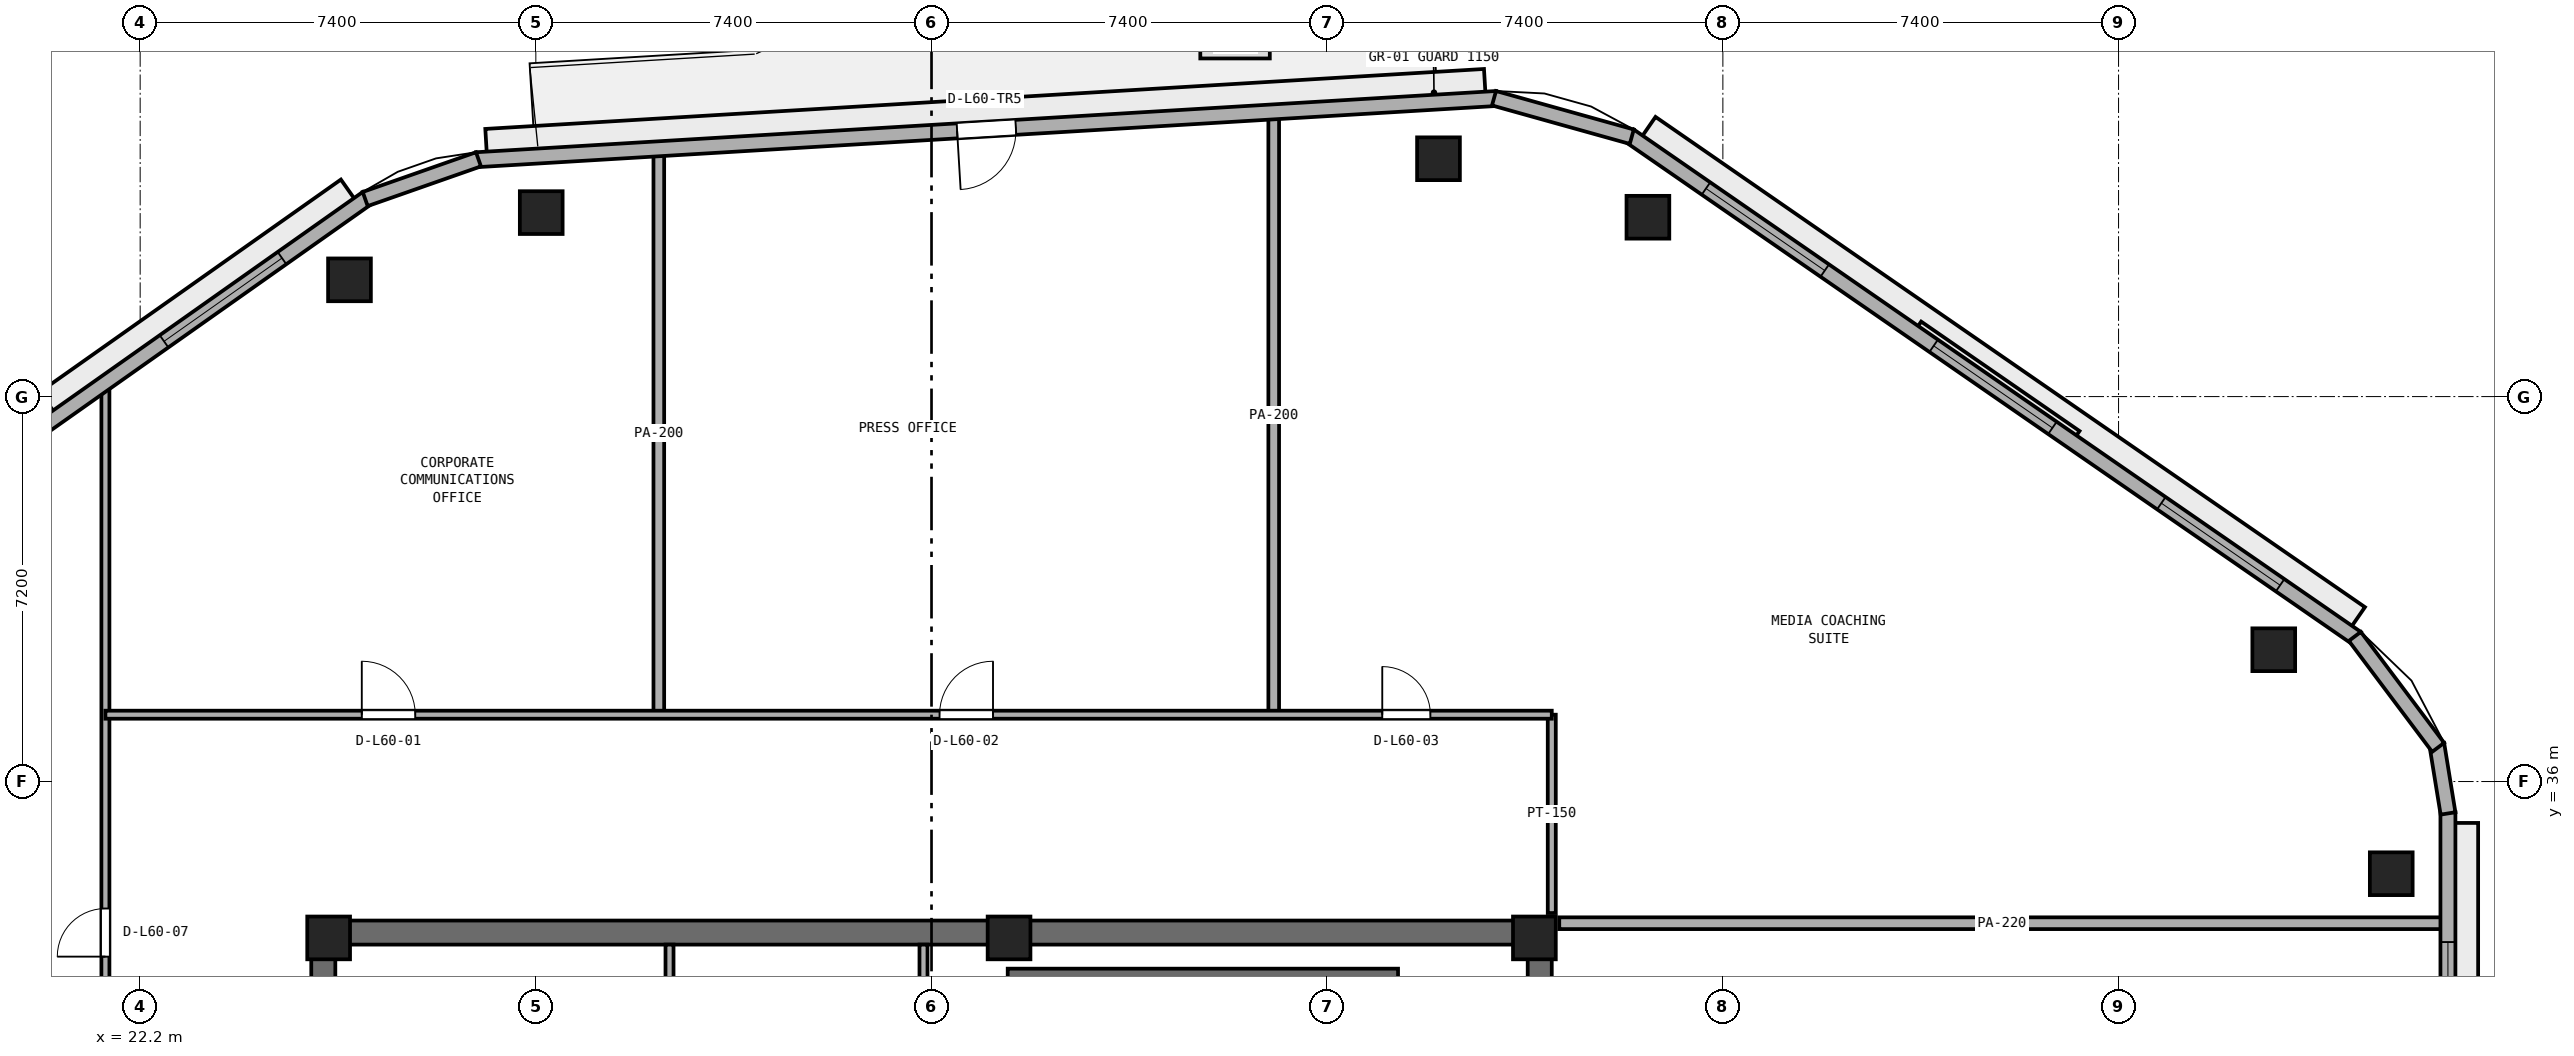
"""IFC4 building model, lengths in metres.
Left out: names, types, materials, properties, quantities, classifications, styles, units other than length and angle.
Written with IfcOpenShell. Run it as: python <this file> out.ifc"""

import sys

from ifc_helpers import new_model, si_unit, direction, frame, frame_2d, origin, origin_2d, place, context, subcontext, project, spatial, rectangle, extrude, element, fill, save


model = new_model("IFC4")
c1 = context("Model", 3, precision=1e-05, world=origin(), true_north=direction((0.0, 1.0)))
c2 = subcontext(c1, "Body", "Model", "MODEL_VIEW")
j1 = project(units=[si_unit("LENGTHUNIT", "METRE"), si_unit("PLANEANGLEUNIT", "RADIAN")], contexts=[c1])
p1 = place(None, origin())
s1 = spatial("IfcSite", under=j1, at=p1, CompositionType="ELEMENT")
p2 = place(p1, origin())
s2 = spatial("IfcBuilding", under=s1, at=p2, CompositionType="ELEMENT")
p3 = place(p2, frame((0.0, 0.0, 236.4)))
s3 = spatial("IfcBuildingStorey", under=s2, at=p3, CompositionType="ELEMENT", Elevation=236.4)
p4 = place(p3, frame((25.4, 33.175, 0.0), z_axis=(0.0, 0.0, 1.0), x_axis=(1.0, 0.0, 0.0)))
e1 = element("IfcWall", 1, at=p4, inside=s3, PredefinedType="SHEAR", context=c2, shape_type="SweptSolid", body=[
    extrude(rectangle(XDim=23.2, YDim=0.45, at=frame_2d((11.6, 0.0))), origin(), (0.0, 0.0, 1.0), 3.51),
])
p5 = place(p3, frame((25.625, 17.45, 0.0), z_axis=(0.0, 0.0, 1.0), x_axis=(0.0, 1.0, 0.0)))
e2 = element("IfcWall", 2, at=p5, inside=s3, PredefinedType="SHEAR", context=c2, shape_type="SweptSolid", body=[
    extrude(rectangle(XDim=15.5, YDim=0.45, at=frame_2d((7.75, 0.0))), origin(), (0.0, 0.0, 1.0), 3.51),
])
p6 = place(p5, frame((7.0, 0.0, 0.0)))
e3 = element("IfcOpeningElement", 3, at=p6, cuts=e2, PredefinedType="OPENING", context=c2, shape_type="SweptSolid", body=[
    extrude(rectangle(XDim=1.5, YDim=2.15, at=frame_2d((0.75, 1.075))), frame((0.0, 0.235, 0.0), z_axis=(0.0, -1.0, 0.0), x_axis=(1.0, 0.0, 0.0)), (0.0, 0.0, 1.0), 0.47),
])
p7 = place(p3, frame((48.375, 17.45, 0.0), z_axis=(0.0, 0.0, 1.0), x_axis=(0.0, 1.0, 0.0)))
e4 = element("IfcWall", 4, at=p7, inside=s3, PredefinedType="SHEAR", context=c2, shape_type="SweptSolid", body=[
    extrude(rectangle(XDim=15.5, YDim=0.45, at=frame_2d((7.75, 0.0))), origin(), (0.0, 0.0, 1.0), 3.51),
])
p8 = place(p7, frame((5.85, 0.0, 0.0)))
e5 = element("IfcOpeningElement", 5, at=p8, cuts=e4, PredefinedType="OPENING", context=c2, shape_type="SweptSolid", body=[
    extrude(rectangle(XDim=1.5, YDim=2.15, at=frame_2d((0.75, 1.075))), frame((0.0, 0.235, 0.0), z_axis=(0.0, -1.0, 0.0), x_axis=(1.0, 0.0, 0.0)), (0.0, 0.0, 1.0), 0.47),
])
for number, where, z_axis, x_axis in (
    (6, (48.275, 33.075, 0.0), (0.0, 0.0, 1.0), (1.0, 0.0, 0.0)),
    (7, (38.45, 33.075, 0.0), (0.0, 0.0, 1.0), (1.0, 0.0, 0.0)),
    (8, (25.725, 33.075, 0.0), (0.0, 0.0, 1.0), (1.0, 0.0, 0.0)),
):
    element("IfcColumn", number, at=place(p3, frame(where, z_axis=z_axis, x_axis=x_axis)), inside=s3, PredefinedType="PILASTER", context=c2, shape_type="SweptSolid", body=[
        extrude(rectangle(XDim=0.8, YDim=0.8, at=origin_2d()), origin(), (0.0, 0.0, 1.0), 3.8),
    ])
for number, where, z_axis, x_axis in (
    (9, (64.3, 34.276, 0.0), (0.0, 0.0, 1.0), (1.0, 0.0, 0.0)),
    (10, (62.103, 38.465, 0.0), (0.0, 0.0, 1.0), (1.0, 0.0, 0.0)),
    (11, (50.398, 46.554, 0.0), (0.0, 0.0, 1.0), (1.0, 0.0, 0.0)),
    (12, (46.481, 47.648, 0.0), (0.0, 0.0, 1.0), (1.0, 0.0, 0.0)),
    (13, (29.701, 46.641, 0.0), (0.0, 0.0, 1.0), (1.0, 0.0, 0.0)),
    (14, (26.115, 45.384, 0.0), (0.0, 0.0, 1.0), (1.0, 0.0, 0.0)),
):
    element("IfcColumn", number, at=place(p3, frame(where, z_axis=z_axis, x_axis=x_axis)), inside=s3, PredefinedType="COLUMN", context=c2, shape_type="SweptSolid", body=[
        extrude(rectangle(XDim=0.8, YDim=0.8, at=origin_2d()), origin(), (0.0, 0.0, 1.0), 3.8),
    ])
p9 = place(p3, frame((38.425, 32.375, 0.0), z_axis=(0.0, 0.0, 1.0), x_axis=(1.0, 0.0, 0.0)))
e15 = element("IfcWall", 15, at=p9, inside=s3, PredefinedType="SHEAR", context=c2, shape_type="SweptSolid", body=[
    extrude(rectangle(XDim=7.3, YDim=0.25, at=frame_2d((3.65, 0.0))), origin(), (0.0, 0.0, 1.0), 3.51),
])
for number, where, z_axis, x_axis in (
    (16, (32.1, 30.65, 0.0), (0.0, 0.0, 1.0), (0.0, 1.0, 0.0)),
    (17, (36.85, 30.65, 0.0), (0.0, 0.0, 1.0), (0.0, 1.0, 0.0)),
):
    element("IfcWall", number, at=place(p3, frame(where, z_axis=z_axis, x_axis=x_axis)), inside=s3, PredefinedType="PARTITIONING", context=c2, shape_type="SweptSolid", body=[
        extrude(rectangle(XDim=2.3, YDim=0.15, at=frame_2d((1.15, 0.0))), origin(), (0.0, 0.0, 1.0), 3.51),
    ])
p10 = place(p3, frame((48.6, 33.54, 0.0), z_axis=(0.0, 0.0, 1.0), x_axis=(0.0, 1.0, 0.0)))
e18 = element("IfcWall", 18, at=p10, inside=s3, PredefinedType="PARTITIONING", context=c2, shape_type="SweptSolid", body=[
    extrude(rectangle(XDim=3.71, YDim=0.15, at=frame_2d((1.855, 0.0))), origin(), (0.0, 0.0, 1.0), 2.893),
])
p11 = place(p3, frame((43.4, 37.25, 0.0), z_axis=(0.0, 0.0, 1.0), x_axis=(0.0, 1.0, 0.0)))
e19 = element("IfcWall", 19, at=p11, inside=s3, PredefinedType="PARTITIONING", context=c2, shape_type="SweptSolid", body=[
    extrude(rectangle(XDim=11.211, YDim=0.2, at=frame_2d((5.605, 0.0))), origin(), (0.0, 0.0, 1.0), 3.51),
])
p12 = place(p3, frame((31.9, 37.25, 0.0), z_axis=(0.0, 0.0, 1.0), x_axis=(0.0, 1.0, 0.0)))
e20 = element("IfcWall", 20, at=p12, inside=s3, PredefinedType="PARTITIONING", context=c2, shape_type="SweptSolid", body=[
    extrude(rectangle(XDim=10.52, YDim=0.2, at=frame_2d((5.26, 0.0))), origin(), (0.0, 0.0, 1.0), 3.51),
])
p13 = place(p3, frame((21.55, 6.608, 0.0), z_axis=(0.0, 0.0, 1.0), x_axis=(0.0, 1.0, 0.0)))
e21 = element("IfcWall", 21, at=p13, inside=s3, PredefinedType="PARTITIONING", context=c2, shape_type="SweptSolid", body=[
    extrude(rectangle(XDim=36.883, YDim=0.15, at=frame_2d((18.441, 0.0))), origin(), (0.0, 0.0, 1.0), 3.51),
])
p14 = place(p13, frame((14.067, 0.0, 0.0)))
e22 = element("IfcOpeningElement", 22, at=p14, cuts=e21, PredefinedType="OPENING", context=c2, shape_type="SweptSolid", body=[
    extrude(rectangle(XDim=0.9, YDim=2.1, at=frame_2d((0.45, 1.05))), frame((0.0, 0.085, 0.0), z_axis=(0.0, -1.0, 0.0), x_axis=(1.0, 0.0, 0.0)), (0.0, 0.0, 1.0), 0.17),
])
p15 = place(p13, frame((26.117, 0.0, 0.0)))
e23 = element("IfcOpeningElement", 23, at=p15, cuts=e21, PredefinedType="OPENING", context=c2, shape_type="SweptSolid", body=[
    extrude(rectangle(XDim=0.9, YDim=2.1, at=frame_2d((0.45, 1.05))), frame((0.0, 0.085, 0.0), z_axis=(0.0, -1.0, 0.0), x_axis=(1.0, 0.0, 0.0)), (0.0, 0.0, 1.0), 0.17),
])
p16 = place(p3, frame((48.74, 33.35, 0.0), z_axis=(0.0, 0.0, 1.0), x_axis=(1.0, 0.0, 0.0)))
e24 = element("IfcWall", 24, at=p16, inside=s3, PredefinedType="PARTITIONING", context=c2, shape_type="SweptSolid", body=[
    extrude(rectangle(XDim=16.555, YDim=0.22, at=frame_2d((8.277, 0.0))), origin(), (0.0, 0.0, 1.0), 2.893),
])
p17 = place(p3, frame((21.55, 37.25, 0.0), z_axis=(0.0, 0.0, 1.0), x_axis=(1.0, 0.0, 0.0)))
e25 = element("IfcWall", 25, at=p17, inside=s3, PredefinedType="PARTITIONING", context=c2, shape_type="SweptSolid", body=[
    extrude(rectangle(XDim=27.05, YDim=0.15, at=frame_2d((13.525, 0.0))), origin(), (0.0, 0.0, 1.0), 3.51),
])
p18 = place(p17, frame((4.795, 0.0, 0.0)))
e26 = element("IfcOpeningElement", 26, at=p18, cuts=e25, PredefinedType="OPENING", context=c2, shape_type="SweptSolid", body=[
    extrude(rectangle(XDim=1.0, YDim=2.12, at=frame_2d((0.5, 1.06))), frame((0.0, 0.085, 0.0), z_axis=(0.0, -1.0, 0.0), x_axis=(1.0, 0.0, 0.0)), (0.0, 0.0, 1.0), 0.17),
])
p19 = place(p17, frame((15.6, 0.0, 0.0)))
e27 = element("IfcOpeningElement", 27, at=p19, cuts=e25, PredefinedType="OPENING", context=c2, shape_type="SweptSolid", body=[
    extrude(rectangle(XDim=1.0, YDim=2.12, at=frame_2d((0.5, 1.06))), frame((0.0, 0.085, 0.0), z_axis=(0.0, -1.0, 0.0), x_axis=(1.0, 0.0, 0.0)), (0.0, 0.0, 1.0), 0.17),
])
p20 = place(p17, frame((23.88, 0.0, 0.0)))
e28 = element("IfcOpeningElement", 28, at=p20, cuts=e25, PredefinedType="OPENING", context=c2, shape_type="SweptSolid", body=[
    extrude(rectangle(XDim=0.9, YDim=2.1, at=frame_2d((0.45, 1.05))), frame((0.0, 0.085, 0.0), z_axis=(0.0, -1.0, 0.0), x_axis=(1.0, 0.0, 0.0)), (0.0, 0.0, 1.0), 0.17),
])
p21 = place(p3, frame((65.36, 16.258, 0.0), z_axis=(0.0, 0.0, 1.0), x_axis=(0.0, 1.0, 0.0)))
e29 = element("IfcWall", 29, at=p21, inside=s3, PredefinedType="STANDARD", context=c2, shape_type="SweptSolid", body=[
    extrude(rectangle(XDim=19.168, YDim=0.28, at=frame_2d((9.584, 0.0))), origin(), (0.0, 0.0, 1.0), 3.51),
])
p22 = place(p21, frame((2.178, 0.0, 0.9)))
e30 = element("IfcOpeningElement", 30, at=p22, cuts=e29, PredefinedType="OPENING", context=c2, shape_type="SweptSolid", body=[
    extrude(rectangle(XDim=2.7, YDim=1.75, at=frame_2d((1.35, 0.875))), frame((0.0, 0.15, 0.0), z_axis=(0.0, -1.0, 0.0), x_axis=(1.0, 0.0, 0.0)), (0.0, 0.0, 1.0), 0.3),
])
p23 = place(p21, frame((7.984, 0.0, 0.9)))
e31 = element("IfcOpeningElement", 31, at=p23, cuts=e29, PredefinedType="OPENING", context=c2, shape_type="SweptSolid", body=[
    extrude(rectangle(XDim=2.7, YDim=1.75, at=frame_2d((1.35, 0.875))), frame((0.0, 0.15, 0.0), z_axis=(0.0, -1.0, 0.0), x_axis=(1.0, 0.0, 0.0)), (0.0, 0.0, 1.0), 0.3),
])
p24 = place(p21, frame((14.04, 0.0, 0.9)))
e32 = element("IfcOpeningElement", 32, at=p24, cuts=e29, PredefinedType="OPENING", context=c2, shape_type="SweptSolid", body=[
    extrude(rectangle(XDim=2.7, YDim=1.75, at=frame_2d((1.35, 0.875))), frame((0.0, 0.15, 0.0), z_axis=(0.0, -1.0, 0.0), x_axis=(1.0, 0.0, 0.0)), (0.0, 0.0, 1.0), 0.3),
])
p25 = place(p3, frame((63.651, 38.683, 0.0), z_axis=(0.0, 0.0, 1.0), x_axis=(-0.822655095, 0.568540759022, 0.0)))
e33 = element("IfcWall", 33, at=p25, inside=s3, PredefinedType="STANDARD", context=c2, shape_type="SweptSolid", body=[
    extrude(rectangle(XDim=16.528, YDim=0.28, at=frame_2d((8.264, 0.0))), origin(), (0.0, 0.0, 1.0), 3.51),
])
p26 = place(p25, frame((1.738, 0.0, 0.9)))
e34 = element("IfcOpeningElement", 34, at=p26, cuts=e33, PredefinedType="OPENING", context=c2, shape_type="SweptSolid", body=[
    extrude(rectangle(XDim=2.7, YDim=1.75, at=frame_2d((1.35, 0.875))), frame((0.0, 0.15, 0.0), z_axis=(0.0, -1.0, 0.0), x_axis=(1.0, 0.0, 0.0)), (0.0, 0.0, 1.0), 0.3),
])
p27 = place(p25, frame((6.914, 0.0, 0.9)))
e35 = element("IfcOpeningElement", 35, at=p27, cuts=e33, PredefinedType="OPENING", context=c2, shape_type="SweptSolid", body=[
    extrude(rectangle(XDim=2.7, YDim=1.75, at=frame_2d((1.35, 0.875))), frame((0.0, 0.15, 0.0), z_axis=(0.0, -1.0, 0.0), x_axis=(1.0, 0.0, 0.0)), (0.0, 0.0, 1.0), 0.3),
])
p28 = place(p25, frame((12.09, 0.0, 0.9)))
e36 = element("IfcOpeningElement", 36, at=p28, cuts=e33, PredefinedType="OPENING", context=c2, shape_type="SweptSolid", body=[
    extrude(rectangle(XDim=2.7, YDim=1.75, at=frame_2d((1.35, 0.875))), frame((0.0, 0.15, 0.0), z_axis=(0.0, -1.0, 0.0), x_axis=(1.0, 0.0, 0.0)), (0.0, 0.0, 1.0), 0.3),
])
p29 = place(p3, frame((47.566, 48.775, 0.0), z_axis=(0.0, 0.0, 1.0), x_axis=(-0.998202767485, -0.059926913695, 0.0)))
e37 = element("IfcWall", 37, at=p29, inside=s3, PredefinedType="STANDARD", context=c2, shape_type="SweptSolid", body=[
    extrude(rectangle(XDim=19.111, YDim=0.28, at=frame_2d((9.556, 0.0))), origin(), (0.0, 0.0, 1.0), 3.51),
])
p30 = place(p29, frame((9.005, 0.0, 0.0)))
e38 = element("IfcOpeningElement", 38, at=p30, cuts=e37, PredefinedType="OPENING", context=c2, shape_type="SweptSolid", body=[
    extrude(rectangle(XDim=1.1, YDim=2.2, at=frame_2d((0.55, 1.1))), frame((0.0, 0.15, 0.0), z_axis=(0.0, -1.0, 0.0), x_axis=(1.0, 0.0, 0.0)), (0.0, 0.0, 1.0), 0.3),
])
p31 = place(p3, frame((26.443, 46.913, 0.0), z_axis=(0.0, 0.0, 1.0), x_axis=(-0.817024179766, -0.576603407619, 0.0)))
e39 = element("IfcWall", 39, at=p31, inside=s3, PredefinedType="STANDARD", context=c2, shape_type="SweptSolid", body=[
    extrude(rectangle(XDim=17.78, YDim=0.28, at=frame_2d((8.89, 0.0))), origin(), (0.0, 0.0, 1.0), 3.51),
])
p32 = place(p31, frame((1.947, 0.0, 0.9)))
e40 = element("IfcOpeningElement", 40, at=p32, cuts=e39, PredefinedType="OPENING", context=c2, shape_type="SweptSolid", body=[
    extrude(rectangle(XDim=2.7, YDim=1.75, at=frame_2d((1.35, 0.875))), frame((0.0, 0.15, 0.0), z_axis=(0.0, -1.0, 0.0), x_axis=(1.0, 0.0, 0.0)), (0.0, 0.0, 1.0), 0.3),
])
p33 = place(p31, frame((7.54, 0.0, 0.9)))
e41 = element("IfcOpeningElement", 41, at=p33, cuts=e39, PredefinedType="OPENING", context=c2, shape_type="SweptSolid", body=[
    extrude(rectangle(XDim=2.7, YDim=1.75, at=frame_2d((1.35, 0.875))), frame((0.0, 0.15, 0.0), z_axis=(0.0, -1.0, 0.0), x_axis=(1.0, 0.0, 0.0)), (0.0, 0.0, 1.0), 0.3),
])
p34 = place(p31, frame((13.133, 0.0, 0.9)))
e42 = element("IfcOpeningElement", 42, at=p34, cuts=e39, PredefinedType="OPENING", context=c2, shape_type="SweptSolid", body=[
    extrude(rectangle(XDim=2.7, YDim=1.75, at=frame_2d((1.35, 0.875))), frame((0.0, 0.15, 0.0), z_axis=(0.0, -1.0, 0.0), x_axis=(1.0, 0.0, 0.0)), (0.0, 0.0, 1.0), 0.3),
])
p35 = place(p3, frame((65.362, 35.403, 0.0), z_axis=(0.0, 0.0, 1.0), x_axis=(-0.160271674114, 0.987072940809, 0.0)))
e43 = element("IfcWall", 43, at=p35, inside=s3, PredefinedType="STANDARD", context=c2, shape_type="SweptSolid", body=[
    extrude(rectangle(XDim=1.315, YDim=0.28, at=frame_2d((0.657, 0.0))), origin(), (0.0, 0.0, 1.0), 3.51),
])
p36 = place(p3, frame((65.177, 36.639, 0.0), z_axis=(0.0, 0.0, 1.0), x_axis=(-0.600436386467, 0.799672524104, 0.0)))
e44 = element("IfcWall", 44, at=p36, inside=s3, PredefinedType="STANDARD", context=c2, shape_type="SweptSolid", body=[
    extrude(rectangle(XDim=2.595, YDim=0.28, at=frame_2d((1.298, 0.0))), origin(), (0.0, 0.0, 1.0), 3.51),
])
p37 = place(p3, frame((50.096, 48.061, 0.0), z_axis=(0.0, 0.0, 1.0), x_axis=(-0.963108887091, 0.269112005688, 0.0)))
e45 = element("IfcWall", 45, at=p37, inside=s3, PredefinedType="STANDARD", context=c2, shape_type="SweptSolid", body=[
    extrude(rectangle(XDim=2.675, YDim=0.28, at=frame_2d((1.338, 0.0))), origin(), (0.0, 0.0, 1.0), 3.51),
])
p38 = place(p3, frame((28.527, 47.638, 0.0), z_axis=(0.0, 0.0, 1.0), x_axis=(-0.943686979207, -0.330839667022, 0.0)))
e46 = element("IfcWall", 46, at=p38, inside=s3, PredefinedType="STANDARD", context=c2, shape_type="SweptSolid", body=[
    extrude(rectangle(XDim=2.245, YDim=0.28, at=frame_2d((1.123, 0.0))), origin(), (0.0, 0.0, 1.0), 3.51),
])
p39 = place(p18, origin())
e47 = element("IfcDoor", 47, at=p39, inside=s3, OperationType="SINGLE_SWING_LEFT", PredefinedType="DOOR", context=c2, shape_type="SweptSolid", body=[
    extrude(rectangle(XDim=1.0, YDim=2.12, at=frame_2d((0.5, 1.06))), frame((0.0, 0.025, 0.0), z_axis=(0.0, -1.0, 0.0), x_axis=(1.0, 0.0, 0.0)), (0.0, 0.0, 1.0), 0.05),
])
fill(e26, e47)
p40 = place(p19, origin())
e48 = element("IfcDoor", 48, at=p40, inside=s3, OperationType="SINGLE_SWING_RIGHT", PredefinedType="DOOR", context=c2, shape_type="SweptSolid", body=[
    extrude(rectangle(XDim=1.0, YDim=2.12, at=frame_2d((0.5, 1.06))), frame((0.0, 0.025, 0.0), z_axis=(0.0, -1.0, 0.0), x_axis=(1.0, 0.0, 0.0)), (0.0, 0.0, 1.0), 0.05),
])
fill(e27, e48)
p41 = place(p20, origin())
e49 = element("IfcDoor", 49, at=p41, inside=s3, OperationType="SINGLE_SWING_LEFT", PredefinedType="DOOR", context=c2, shape_type="SweptSolid", body=[
    extrude(rectangle(XDim=0.9, YDim=2.1, at=frame_2d((0.45, 1.05))), frame((0.0, 0.025, 0.0), z_axis=(0.0, -1.0, 0.0), x_axis=(1.0, 0.0, 0.0)), (0.0, 0.0, 1.0), 0.05),
])
fill(e28, e49)
p42 = place(p15, origin())
e50 = element("IfcDoor", 50, at=p42, inside=s3, OperationType="SINGLE_SWING_LEFT", PredefinedType="DOOR", context=c2, shape_type="SweptSolid", body=[
    extrude(rectangle(XDim=0.9, YDim=2.1, at=frame_2d((0.45, 1.05))), frame((0.0, 0.025, 0.0), z_axis=(0.0, -1.0, 0.0), x_axis=(1.0, 0.0, 0.0)), (0.0, 0.0, 1.0), 0.05),
])
fill(e23, e50)
p43 = place(p24, origin())
e51 = element("IfcWindow", 51, at=p43, inside=s3, PartitioningType="SINGLE_PANEL", PredefinedType="WINDOW", context=c2, shape_type="SweptSolid", body=[
    extrude(rectangle(XDim=2.7, YDim=1.75, at=frame_2d((1.35, 0.875))), frame((0.0, 0.03, 0.0), z_axis=(0.0, -1.0, 0.0), x_axis=(1.0, 0.0, 0.0)), (0.0, 0.0, 1.0), 0.06),
])
fill(e32, e51)
p44 = place(p26, origin())
e52 = element("IfcWindow", 52, at=p44, inside=s3, PartitioningType="SINGLE_PANEL", PredefinedType="WINDOW", context=c2, shape_type="SweptSolid", body=[
    extrude(rectangle(XDim=2.7, YDim=1.75, at=frame_2d((1.35, 0.875))), frame((0.0, 0.03, 0.0), z_axis=(0.0, -1.0, 0.0), x_axis=(1.0, 0.0, 0.0)), (0.0, 0.0, 1.0), 0.06),
])
fill(e34, e52)
p45 = place(p27, origin())
e53 = element("IfcWindow", 53, at=p45, inside=s3, PartitioningType="SINGLE_PANEL", PredefinedType="WINDOW", context=c2, shape_type="SweptSolid", body=[
    extrude(rectangle(XDim=2.7, YDim=1.75, at=frame_2d((1.35, 0.875))), frame((0.0, 0.03, 0.0), z_axis=(0.0, -1.0, 0.0), x_axis=(1.0, 0.0, 0.0)), (0.0, 0.0, 1.0), 0.06),
])
fill(e35, e53)
p46 = place(p28, origin())
e54 = element("IfcWindow", 54, at=p46, inside=s3, PartitioningType="SINGLE_PANEL", PredefinedType="WINDOW", context=c2, shape_type="SweptSolid", body=[
    extrude(rectangle(XDim=2.7, YDim=1.75, at=frame_2d((1.35, 0.875))), frame((0.0, 0.03, 0.0), z_axis=(0.0, -1.0, 0.0), x_axis=(1.0, 0.0, 0.0)), (0.0, 0.0, 1.0), 0.06),
])
fill(e36, e54)
p47 = place(p30, origin())
e55 = element("IfcDoor", 55, at=p47, inside=s3, OperationType="SINGLE_SWING_RIGHT", PredefinedType="DOOR", context=c2, shape_type="SweptSolid", body=[
    extrude(rectangle(XDim=1.1, YDim=2.2, at=frame_2d((0.55, 1.1))), frame((0.0, 0.025, 0.0), z_axis=(0.0, -1.0, 0.0), x_axis=(1.0, 0.0, 0.0)), (0.0, 0.0, 1.0), 0.05),
])
fill(e38, e55)
p48 = place(p32, origin())
e56 = element("IfcWindow", 56, at=p48, inside=s3, PartitioningType="SINGLE_PANEL", PredefinedType="WINDOW", context=c2, shape_type="SweptSolid", body=[
    extrude(rectangle(XDim=2.7, YDim=1.75, at=frame_2d((1.35, 0.875))), frame((0.0, 0.03, 0.0), z_axis=(0.0, -1.0, 0.0), x_axis=(1.0, 0.0, 0.0)), (0.0, 0.0, 1.0), 0.06),
])
fill(e40, e56)
save(model, sys.argv[1])
